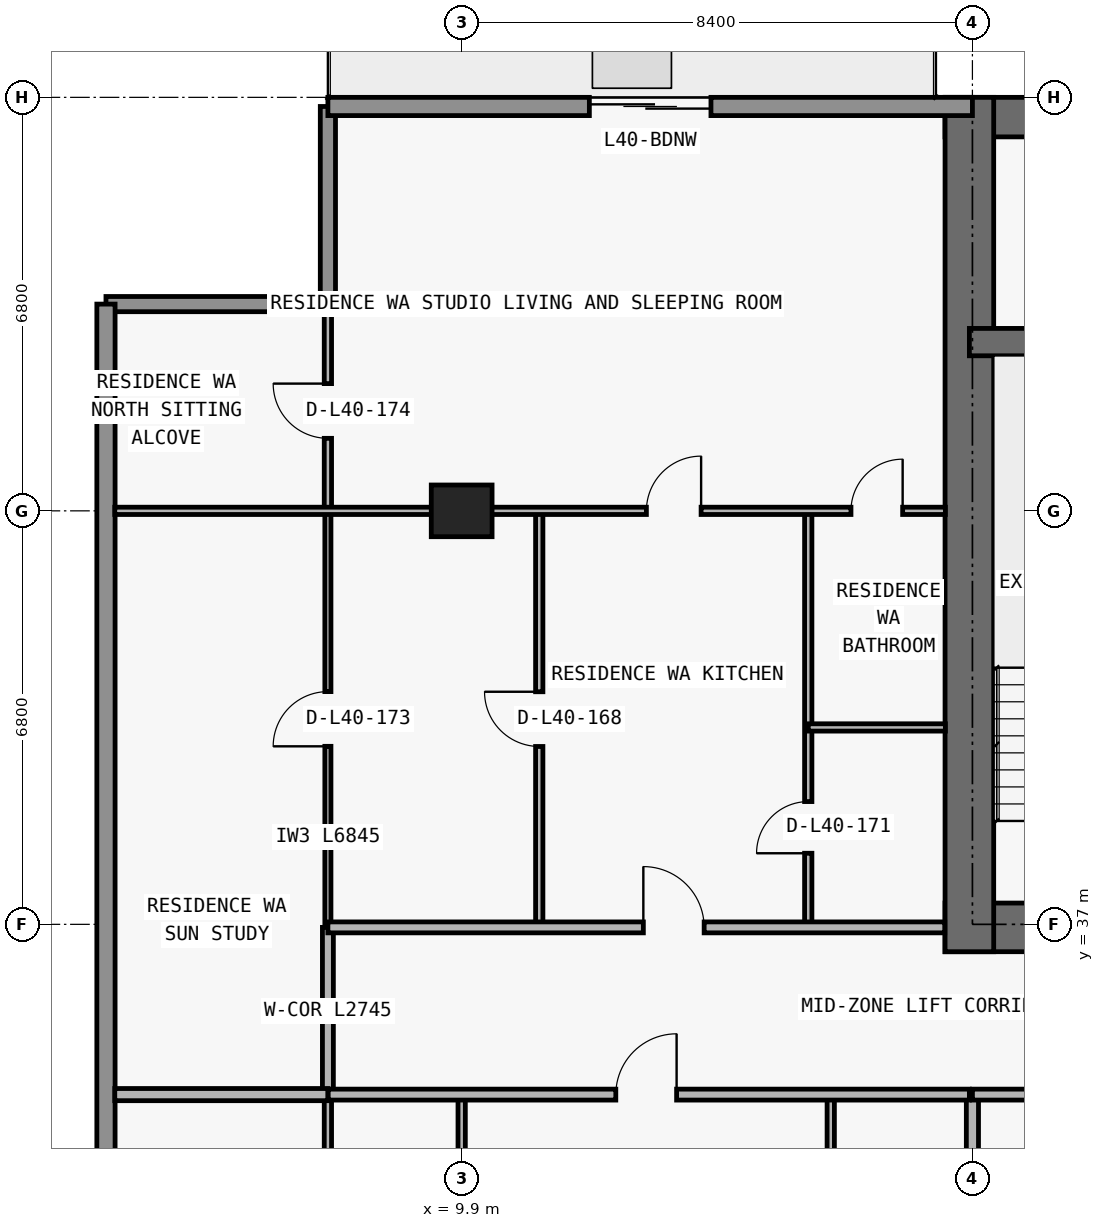
"""IFC4 building model, lengths in metres.
Left out: names, types, materials, properties, quantities, classifications, styles, units other than length and angle.
Written with IfcOpenShell. Run it as: python <this file> out.ifc"""

import sys

from ifc_helpers import new_model, si_unit, direction, frame, frame_2d, origin, origin_2d, place, context, subcontext, project, spatial, rectangle, extrude, element, fill, save


model = new_model("IFC4")
c1 = context("Model", 3, precision=1e-05, world=origin(), true_north=direction((0.0, 1.0)))
c2 = subcontext(c1, "Body", "Model", "MODEL_VIEW")
j1 = project(units=[si_unit("LENGTHUNIT", "METRE"), si_unit("PLANEANGLEUNIT", "RADIAN")], contexts=[c1])
p1 = place(None, origin())
s1 = spatial("IfcSite", under=j1, at=p1, CompositionType="ELEMENT")
p2 = place(p1, origin())
s2 = spatial("IfcBuilding", under=s1, at=p2, CompositionType="ELEMENT")
p3 = place(p2, frame((0.0, 0.0, 145.5)))
s3 = spatial("IfcBuildingStorey", under=s2, at=p3, CompositionType="ELEMENT", Elevation=145.5)
p4 = place(p3, frame((9.9, 43.8, 0.0), z_axis=(0.0, 0.0, 1.0), x_axis=(1.0, 0.0, 0.0)))
e1 = element("IfcColumn", 1, at=p4, inside=s3, PredefinedType="COLUMN", context=c2, shape_type="SweptSolid", body=[
    extrude(rectangle(XDim=1.0, YDim=0.85, at=origin_2d()), origin(), (0.0, 0.0, 1.0), 3.05),
])
p5 = place(p3, frame((17.85, 36.95, 0.0), z_axis=(0.0, 0.0, 1.0), x_axis=(1.0, 0.0, 0.0)))
e2 = element("IfcWall", 2, at=p5, inside=s3, PredefinedType="SHEAR", context=c2, shape_type="SweptSolid", body=[
    extrude(rectangle(XDim=42.1, YDim=0.8, at=frame_2d((21.05, 0.0))), origin(), (0.0, 0.0, 1.0), 3.05),
])
p6 = place(p5, frame((14.45, 0.0, 0.0)))
e3 = element("IfcOpeningElement", 3, at=p6, cuts=e2, PredefinedType="OPENING", context=c2, shape_type="SweptSolid", body=[
    extrude(rectangle(XDim=1.1, YDim=2.15, at=frame_2d((0.55, 1.075))), frame((0.0, 0.41, 0.0), z_axis=(0.0, -1.0, 0.0), x_axis=(1.0, 0.0, 0.0)), (0.0, 0.0, 1.0), 0.82),
])
p7 = place(p5, frame((6.3, 0.0, 0.0)))
e4 = element("IfcOpeningElement", 4, at=p7, cuts=e2, PredefinedType="OPENING", context=c2, shape_type="SweptSolid", body=[
    extrude(rectangle(XDim=1.05, YDim=2.15, at=frame_2d((0.525, 1.075))), frame((0.0, 0.41, 0.0), z_axis=(0.0, -1.0, 0.0), x_axis=(1.0, 0.0, 0.0)), (0.0, 0.0, 1.0), 0.82),
])
p8 = place(p5, frame((34.8, 0.0, 0.0)))
e5 = element("IfcOpeningElement", 5, at=p8, cuts=e2, PredefinedType="OPENING", context=c2, shape_type="SweptSolid", body=[
    extrude(rectangle(XDim=1.05, YDim=2.15, at=frame_2d((0.525, 1.075))), frame((0.0, 0.41, 0.0), z_axis=(0.0, -1.0, 0.0), x_axis=(1.0, 0.0, 0.0)), (0.0, 0.0, 1.0), 0.82),
])
p9 = place(p5, frame((10.913, 0.0, 0.0)))
e6 = element("IfcOpeningElement", 6, at=p9, cuts=e2, PredefinedType="OPENING", context=c2, shape_type="SweptSolid", body=[
    extrude(rectangle(XDim=1.05, YDim=2.15, at=frame_2d((0.525, 1.075))), frame((0.0, 0.41, 0.0), z_axis=(0.0, -1.0, 0.0), x_axis=(1.0, 0.0, 0.0)), (0.0, 0.0, 1.0), 0.82),
])
p10 = place(p5, frame((24.15, 0.0, 0.0)))
e7 = element("IfcOpeningElement", 7, at=p10, cuts=e2, PredefinedType="OPENING", context=c2, shape_type="SweptSolid", body=[
    extrude(rectangle(XDim=1.05, YDim=2.15, at=frame_2d((0.525, 1.075))), frame((0.0, 0.41, 0.0), z_axis=(0.0, -1.0, 0.0), x_axis=(1.0, 0.0, 0.0)), (0.0, 0.0, 1.0), 0.82),
])
p11 = place(p3, frame((17.85, 50.275, 0.0), z_axis=(0.0, 0.0, 1.0), x_axis=(1.0, 0.0, 0.0)))
e8 = element("IfcWall", 8, at=p11, inside=s3, PredefinedType="SHEAR", context=c2, shape_type="SweptSolid", body=[
    extrude(rectangle(XDim=42.1, YDim=0.65, at=frame_2d((21.05, 0.0))), origin(), (0.0, 0.0, 1.0), 3.05),
])
p12 = place(p3, frame((18.25, 36.55, 0.0), z_axis=(0.0, 0.0, 1.0), x_axis=(0.0, 1.0, 0.0)))
e9 = element("IfcWall", 9, at=p12, inside=s3, PredefinedType="SHEAR", context=c2, shape_type="SweptSolid", body=[
    extrude(rectangle(XDim=14.05, YDim=0.8, at=frame_2d((7.025, 0.0))), origin(), (0.0, 0.0, 1.0), 3.05),
])
p13 = place(p3, frame((18.25, 46.575, 0.0), z_axis=(0.0, 0.0, 1.0), x_axis=(1.0, 0.0, 0.0)))
e10 = element("IfcWall", 10, at=p13, inside=s3, PredefinedType="SHEAR", context=c2, shape_type="SweptSolid", body=[
    extrude(rectangle(XDim=41.3, YDim=0.45, at=frame_2d((20.65, 0.0))), origin(), (0.0, 0.0, 1.0), 3.05),
])
p14 = place(p13, frame((7.625, 0.0, 0.0)))
e11 = element("IfcOpeningElement", 11, at=p14, cuts=e10, PredefinedType="OPENING", context=c2, shape_type="SweptSolid", body=[
    extrude(rectangle(XDim=1.05, YDim=2.15, at=frame_2d((0.525, 1.075))), frame((0.0, 0.235, 0.0), z_axis=(0.0, -1.0, 0.0), x_axis=(1.0, 0.0, 0.0)), (0.0, 0.0, 1.0), 0.47),
])
p15 = place(p13, frame((32.675, 0.0, 0.0)))
e12 = element("IfcOpeningElement", 12, at=p15, cuts=e10, PredefinedType="OPENING", context=c2, shape_type="SweptSolid", body=[
    extrude(rectangle(XDim=1.05, YDim=2.15, at=frame_2d((0.525, 1.075))), frame((0.0, 0.235, 0.0), z_axis=(0.0, -1.0, 0.0), x_axis=(1.0, 0.0, 0.0)), (0.0, 0.0, 1.0), 0.47),
])
p16 = place(p3, frame((4.05, 47.2, 0.0), z_axis=(0.0, 0.0, 1.0), x_axis=(1.0, 0.0, 0.0)))
e13 = element("IfcWall", 13, at=p16, inside=s3, PredefinedType="ELEMENTEDWALL", context=c2, shape_type="SweptSolid", body=[
    extrude(rectangle(XDim=3.65, YDim=0.25, at=frame_2d((1.825, 0.0))), origin(), (0.0, 0.0, 1.0), 3.05),
])
p17 = place(p3, frame((7.7, 47.2, 0.0), z_axis=(0.0, 0.0, 1.0), x_axis=(0.0, 1.0, 0.0)))
e14 = element("IfcWall", 14, at=p17, inside=s3, PredefinedType="ELEMENTEDWALL", context=c2, shape_type="SweptSolid", body=[
    extrude(rectangle(XDim=3.25, YDim=0.25, at=frame_2d((1.625, 0.0))), origin(), (0.0, 0.0, 1.0), 3.05),
])
p18 = place(p3, frame((4.05, 28.0, 0.0), z_axis=(0.0, 0.0, 1.0), x_axis=(0.0, 1.0, 0.0)))
e15 = element("IfcWall", 15, at=p18, inside=s3, PredefinedType="STANDARD", context=c2, shape_type="SweptSolid", body=[
    extrude(rectangle(XDim=19.2, YDim=0.3, at=frame_2d((9.6, 0.0))), origin(), (0.0, 0.0, 1.0), 3.05),
])
p19 = place(p3, frame((7.7, 50.45, 0.0), z_axis=(0.0, 0.0, 1.0), x_axis=(1.0, 0.0, 0.0)))
e16 = element("IfcWall", 16, at=p19, inside=s3, PredefinedType="STANDARD", context=c2, shape_type="SweptSolid", body=[
    extrude(rectangle(XDim=10.6, YDim=0.3, at=frame_2d((5.3, 0.0))), origin(), (0.0, 0.0, 1.0), 3.05),
])
p20 = place(p19, frame((4.3, 0.0, 0.0)))
e17 = element("IfcOpeningElement", 17, at=p20, cuts=e16, PredefinedType="OPENING", context=c2, shape_type="SweptSolid", body=[
    extrude(rectangle(XDim=2.0, YDim=2.3, at=frame_2d((1.0, 1.15))), frame((0.0, 0.16, 0.0), z_axis=(0.0, -1.0, 0.0), x_axis=(1.0, 0.0, 0.0)), (0.0, 0.0, 1.0), 0.32),
])
p21 = place(p3, frame((7.7, 29.84, 0.0), z_axis=(0.0, 0.0, 1.0), x_axis=(0.0, 1.0, 0.0)))
e18 = element("IfcWall", 18, at=p21, inside=s3, PredefinedType="PARTITIONING", context=c2, shape_type="SweptSolid", body=[
    extrude(rectangle(XDim=4.36, YDim=0.12, at=frame_2d((2.18, 0.0))), origin(), (0.0, 0.0, 1.0), 3.05),
])
p22 = place(p3, frame((7.7, 34.205, 0.0), z_axis=(0.0, 0.0, 1.0), x_axis=(0.0, 1.0, 0.0)))
e19 = element("IfcWall", 19, at=p22, inside=s3, PredefinedType="PARTITIONING", context=c2, shape_type="SweptSolid", body=[
    extrude(rectangle(XDim=2.745, YDim=0.18, at=frame_2d((1.373, 0.0))), origin(), (0.0, 0.0, 1.0), 3.05),
])
p23 = place(p3, frame((7.7, 36.955, 0.0), z_axis=(0.0, 0.0, 1.0), x_axis=(0.0, 1.0, 0.0)))
e20 = element("IfcWall", 20, at=p23, inside=s3, PredefinedType="MOVABLE", context=c2, shape_type="SweptSolid", body=[
    extrude(rectangle(XDim=6.845, YDim=0.1, at=frame_2d((3.422, 0.0))), origin(), (0.0, 0.0, 1.0), 3.05),
])
p24 = place(p23, frame((2.972, 0.0, 0.0)))
e21 = element("IfcOpeningElement", 21, at=p24, cuts=e20, PredefinedType="OPENING", context=c2, shape_type="SweptSolid", body=[
    extrude(rectangle(XDim=0.9, YDim=2.15, at=frame_2d((0.45, 1.075))), frame((0.0, 0.06, 0.0), z_axis=(0.0, -1.0, 0.0), x_axis=(1.0, 0.0, 0.0)), (0.0, 0.0, 1.0), 0.12),
])
p25 = place(p3, frame((7.7, 43.805, 0.0), z_axis=(0.0, 0.0, 1.0), x_axis=(0.0, 1.0, 0.0)))
e22 = element("IfcWall", 22, at=p25, inside=s3, PredefinedType="PARTITIONING", context=c2, shape_type="SweptSolid", body=[
    extrude(rectangle(XDim=3.275, YDim=0.12, at=frame_2d((1.638, 0.0))), origin(), (0.0, 0.0, 1.0), 3.05),
])
p26 = place(p25, frame((1.188, 0.0, 0.0)))
e23 = element("IfcOpeningElement", 23, at=p26, cuts=e22, PredefinedType="OPENING", context=c2, shape_type="SweptSolid", body=[
    extrude(rectangle(XDim=0.9, YDim=2.15, at=frame_2d((0.45, 1.075))), frame((0.0, 0.07, 0.0), z_axis=(0.0, -1.0, 0.0), x_axis=(1.0, 0.0, 0.0)), (0.0, 0.0, 1.0), 0.14),
])
p27 = place(p3, frame((9.9, 29.84, 0.0), z_axis=(0.0, 0.0, 1.0), x_axis=(0.0, 1.0, 0.0)))
e24 = element("IfcWall", 24, at=p27, inside=s3, PredefinedType="PARTITIONING", context=c2, shape_type="SweptSolid", body=[
    extrude(rectangle(XDim=4.36, YDim=0.12, at=frame_2d((2.18, 0.0))), origin(), (0.0, 0.0, 1.0), 2.174),
])
p28 = place(p3, frame((11.176, 36.95, 0.0), z_axis=(0.0, 0.0, 1.0), x_axis=(0.0, 1.0, 0.0)))
e25 = element("IfcWall", 25, at=p28, inside=s3, PredefinedType="PARTITIONING", context=c2, shape_type="SweptSolid", body=[
    extrude(rectangle(XDim=6.85, YDim=0.12, at=frame_2d((3.425, 0.0))), origin(), (0.0, 0.0, 1.0), 3.05),
])
p29 = place(p28, frame((2.975, 0.0, 0.0)))
e26 = element("IfcOpeningElement", 26, at=p29, cuts=e25, PredefinedType="OPENING", context=c2, shape_type="SweptSolid", body=[
    extrude(rectangle(XDim=0.9, YDim=2.15, at=frame_2d((0.45, 1.075))), frame((0.0, 0.07, 0.0), z_axis=(0.0, -1.0, 0.0), x_axis=(1.0, 0.0, 0.0)), (0.0, 0.0, 1.0), 0.14),
])
p30 = place(p3, frame((15.6, 36.95, 0.0), z_axis=(0.0, 0.0, 1.0), x_axis=(0.0, 1.0, 0.0)))
e27 = element("IfcWall", 27, at=p30, inside=s3, PredefinedType="PARTITIONING", context=c2, shape_type="SweptSolid", body=[
    extrude(rectangle(XDim=6.85, YDim=0.12, at=frame_2d((3.425, 0.0))), origin(), (0.0, 0.0, 1.0), 2.578),
])
p31 = place(p30, frame((1.219, 0.0, 0.0)))
e28 = element("IfcOpeningElement", 28, at=p31, cuts=e27, PredefinedType="OPENING", context=c2, shape_type="SweptSolid", body=[
    extrude(rectangle(XDim=0.85, YDim=2.1, at=frame_2d((0.425, 1.05))), frame((0.0, 0.07, 0.0), z_axis=(0.0, -1.0, 0.0), x_axis=(1.0, 0.0, 0.0)), (0.0, 0.0, 1.0), 0.14),
])
p32 = place(p3, frame((15.97, 29.84, 0.0), z_axis=(0.0, 0.0, 1.0), x_axis=(0.0, 1.0, 0.0)))
e29 = element("IfcWall", 29, at=p32, inside=s3, PredefinedType="PARTITIONING", context=c2, shape_type="SweptSolid", body=[
    extrude(rectangle(XDim=4.36, YDim=0.12, at=frame_2d((2.18, 0.0))), origin(), (0.0, 0.0, 1.0), 3.05),
])
p33 = place(p32, frame((1.755, 0.0, 0.0)))
e30 = element("IfcOpeningElement", 30, at=p33, cuts=e29, PredefinedType="OPENING", context=c2, shape_type="SweptSolid", body=[
    extrude(rectangle(XDim=0.85, YDim=2.1, at=frame_2d((0.425, 1.05))), frame((0.0, 0.07, 0.0), z_axis=(0.0, -1.0, 0.0), x_axis=(1.0, 0.0, 0.0)), (0.0, 0.0, 1.0), 0.14),
])
p34 = place(p3, frame((18.3, 29.84, 0.0), z_axis=(0.0, 0.0, 1.0), x_axis=(0.0, 1.0, 0.0)))
e31 = element("IfcWall", 31, at=p34, inside=s3, PredefinedType="PARTITIONING", context=c2, shape_type="SweptSolid", body=[
    extrude(rectangle(XDim=4.36, YDim=0.2, at=frame_2d((2.18, 0.0))), origin(), (0.0, 0.0, 1.0), 2.174),
])
p35 = place(p3, frame((4.195, 34.2, 0.0), z_axis=(0.0, 0.0, 1.0), x_axis=(1.0, 0.0, 0.0)))
e32 = element("IfcWall", 32, at=p35, inside=s3, PredefinedType="PARTITIONING", context=c2, shape_type="SweptSolid", body=[
    extrude(rectangle(XDim=3.505, YDim=0.2, at=frame_2d((1.752, 0.0))), origin(), (0.0, 0.0, 1.0), 3.05),
])
p36 = place(p3, frame((7.705, 34.2, 0.0), z_axis=(0.0, 0.0, 1.0), x_axis=(1.0, 0.0, 0.0)))
e33 = element("IfcWall", 33, at=p36, inside=s3, PredefinedType="PARTITIONING", context=c2, shape_type="SweptSolid", body=[
    extrude(rectangle(XDim=10.545, YDim=0.18, at=frame_2d((5.272, 0.0))), origin(), (0.0, 0.0, 1.0), 3.05),
])
p37 = place(p36, frame((4.73, 0.0, 0.0)))
e34 = element("IfcOpeningElement", 34, at=p37, cuts=e33, PredefinedType="OPENING", context=c2, shape_type="SweptSolid", body=[
    extrude(rectangle(XDim=1.0, YDim=2.2, at=frame_2d((0.5, 1.1))), frame((0.0, 0.1, 0.0), z_axis=(0.0, -1.0, 0.0), x_axis=(1.0, 0.0, 0.0)), (0.0, 0.0, 1.0), 0.2),
])
p38 = place(p3, frame((18.3, 34.2, 0.0), z_axis=(0.0, 0.0, 1.0), x_axis=(1.0, 0.0, 0.0)))
e35 = element("IfcWall", 35, at=p38, inside=s3, PredefinedType="PARTITIONING", context=c2, shape_type="SweptSolid", body=[
    extrude(rectangle(XDim=8.35, YDim=0.18, at=frame_2d((4.175, 0.0))), origin(), (0.0, 0.0, 1.0), 3.05),
])
p39 = place(p38, frame((2.683, 0.0, 0.0)))
e36 = element("IfcOpeningElement", 36, at=p39, cuts=e35, PredefinedType="OPENING", context=c2, shape_type="SweptSolid", body=[
    extrude(rectangle(XDim=1.0, YDim=2.2, at=frame_2d((0.5, 1.1))), frame((0.0, 0.1, 0.0), z_axis=(0.0, -1.0, 0.0), x_axis=(1.0, 0.0, 0.0)), (0.0, 0.0, 1.0), 0.2),
])
p40 = place(p3, frame((7.7, 36.95, 0.0), z_axis=(0.0, 0.0, 1.0), x_axis=(1.0, 0.0, 0.0)))
e37 = element("IfcWall", 37, at=p40, inside=s3, PredefinedType="PARTITIONING", context=c2, shape_type="SweptSolid", body=[
    extrude(rectangle(XDim=10.145, YDim=0.18, at=frame_2d((5.073, 0.0))), origin(), (0.0, 0.0, 1.0), 3.05),
])
p41 = place(p40, frame((5.188, 0.0, 0.0)))
e38 = element("IfcOpeningElement", 38, at=p41, cuts=e37, PredefinedType="OPENING", context=c2, shape_type="SweptSolid", body=[
    extrude(rectangle(XDim=1.0, YDim=2.2, at=frame_2d((0.5, 1.1))), frame((0.0, 0.1, 0.0), z_axis=(0.0, -1.0, 0.0), x_axis=(1.0, 0.0, 0.0)), (0.0, 0.0, 1.0), 0.2),
])
p42 = place(p3, frame((15.6, 40.238, 0.0), z_axis=(0.0, 0.0, 1.0), x_axis=(1.0, 0.0, 0.0)))
e39 = element("IfcWall", 39, at=p42, inside=s3, PredefinedType="PARTITIONING", context=c2, shape_type="SweptSolid", body=[
    extrude(rectangle(XDim=2.255, YDim=0.12, at=frame_2d((1.127, 0.0))), origin(), (0.0, 0.0, 1.0), 3.05),
])
p43 = place(p3, frame((4.195, 43.8, 0.0), z_axis=(0.0, 0.0, 1.0), x_axis=(1.0, 0.0, 0.0)))
e40 = element("IfcWall", 40, at=p43, inside=s3, PredefinedType="PARTITIONING", context=c2, shape_type="SweptSolid", body=[
    extrude(rectangle(XDim=13.66, YDim=0.12, at=frame_2d((6.83, 0.0))), origin(), (0.0, 0.0, 1.0), 2.339),
])
p44 = place(p43, frame((8.743, 0.0, 0.0)))
e41 = element("IfcOpeningElement", 41, at=p44, cuts=e40, PredefinedType="OPENING", context=c2, shape_type="SweptSolid", body=[
    extrude(rectangle(XDim=0.9, YDim=2.15, at=frame_2d((0.45, 1.075))), frame((0.0, 0.07, 0.0), z_axis=(0.0, -1.0, 0.0), x_axis=(1.0, 0.0, 0.0)), (0.0, 0.0, 1.0), 0.14),
])
p45 = place(p43, frame((12.107, 0.0, 0.0)))
e42 = element("IfcOpeningElement", 42, at=p45, cuts=e40, PredefinedType="OPENING", context=c2, shape_type="SweptSolid", body=[
    extrude(rectangle(XDim=0.85, YDim=2.1, at=frame_2d((0.425, 1.05))), frame((0.0, 0.07, 0.0), z_axis=(0.0, -1.0, 0.0), x_axis=(1.0, 0.0, 0.0)), (0.0, 0.0, 1.0), 0.14),
])
p46 = place(p20, origin())
e43 = element("IfcDoor", 43, at=p46, inside=s3, OperationType="DOUBLE_DOOR_SLIDING", PredefinedType="DOOR", context=c2, shape_type="SweptSolid", body=[
    extrude(rectangle(XDim=2.0, YDim=2.3, at=frame_2d((1.0, 1.15))), frame((0.0, 0.025, 0.0), z_axis=(0.0, -1.0, 0.0), x_axis=(1.0, 0.0, 0.0)), (0.0, 0.0, 1.0), 0.05),
])
fill(e17, e43)
p47 = place(p37, origin())
e44 = element("IfcDoor", 44, at=p47, inside=s3, OperationType="SINGLE_SWING_RIGHT", PredefinedType="DOOR", context=c2, shape_type="SweptSolid", body=[
    extrude(rectangle(XDim=1.0, YDim=2.2, at=frame_2d((0.5, 1.1))), frame((0.0, 0.025, 0.0), z_axis=(0.0, -1.0, 0.0), x_axis=(1.0, 0.0, 0.0)), (0.0, 0.0, 1.0), 0.05),
])
fill(e34, e44)
p48 = place(p29, origin())
e45 = element("IfcDoor", 45, at=p48, inside=s3, OperationType="SINGLE_SWING_RIGHT", PredefinedType="DOOR", context=c2, shape_type="SweptSolid", body=[
    extrude(rectangle(XDim=0.9, YDim=2.15, at=frame_2d((0.45, 1.075))), frame((0.0, 0.025, 0.0), z_axis=(0.0, -1.0, 0.0), x_axis=(1.0, 0.0, 0.0)), (0.0, 0.0, 1.0), 0.05),
])
fill(e26, e45)
p49 = place(p41, origin())
e46 = element("IfcDoor", 46, at=p49, inside=s3, OperationType="SINGLE_SWING_LEFT", PredefinedType="DOOR", context=c2, shape_type="SweptSolid", body=[
    extrude(rectangle(XDim=1.0, YDim=2.2, at=frame_2d((0.5, 1.1))), frame((0.0, 0.025, 0.0), z_axis=(0.0, -1.0, 0.0), x_axis=(1.0, 0.0, 0.0)), (0.0, 0.0, 1.0), 0.05),
])
fill(e38, e46)
p50 = place(p44, origin())
e47 = element("IfcDoor", 47, at=p50, inside=s3, OperationType="SINGLE_SWING_RIGHT", PredefinedType="DOOR", context=c2, shape_type="SweptSolid", body=[
    extrude(rectangle(XDim=0.9, YDim=2.15, at=frame_2d((0.45, 1.075))), frame((0.0, 0.025, 0.0), z_axis=(0.0, -1.0, 0.0), x_axis=(1.0, 0.0, 0.0)), (0.0, 0.0, 1.0), 0.05),
])
fill(e41, e47)
p51 = place(p31, origin())
e48 = element("IfcDoor", 48, at=p51, inside=s3, OperationType="SINGLE_SWING_LEFT", PredefinedType="DOOR", context=c2, shape_type="SweptSolid", body=[
    extrude(rectangle(XDim=0.85, YDim=2.1, at=frame_2d((0.425, 1.05))), frame((0.0, 0.025, 0.0), z_axis=(0.0, -1.0, 0.0), x_axis=(1.0, 0.0, 0.0)), (0.0, 0.0, 1.0), 0.05),
])
fill(e28, e48)
p52 = place(p45, origin())
e49 = element("IfcDoor", 49, at=p52, inside=s3, OperationType="SINGLE_SWING_RIGHT", PredefinedType="DOOR", context=c2, shape_type="SweptSolid", body=[
    extrude(rectangle(XDim=0.85, YDim=2.1, at=frame_2d((0.425, 1.05))), frame((0.0, 0.025, 0.0), z_axis=(0.0, -1.0, 0.0), x_axis=(1.0, 0.0, 0.0)), (0.0, 0.0, 1.0), 0.05),
])
fill(e42, e49)
p53 = place(p24, origin())
e50 = element("IfcDoor", 50, at=p53, inside=s3, OperationType="SINGLE_SWING_LEFT", PredefinedType="DOOR", context=c2, shape_type="SweptSolid", body=[
    extrude(rectangle(XDim=0.9, YDim=2.15, at=frame_2d((0.45, 1.075))), frame((0.0, 0.025, 0.0), z_axis=(0.0, -1.0, 0.0), x_axis=(1.0, 0.0, 0.0)), (0.0, 0.0, 1.0), 0.05),
])
fill(e21, e50)
p54 = place(p26, origin())
e51 = element("IfcDoor", 51, at=p54, inside=s3, OperationType="SINGLE_SWING_RIGHT", PredefinedType="DOOR", context=c2, shape_type="SweptSolid", body=[
    extrude(rectangle(XDim=0.9, YDim=2.15, at=frame_2d((0.45, 1.075))), frame((0.0, 0.025, 0.0), z_axis=(0.0, -1.0, 0.0), x_axis=(1.0, 0.0, 0.0)), (0.0, 0.0, 1.0), 0.05),
])
fill(e23, e51)
save(model, sys.argv[1])
